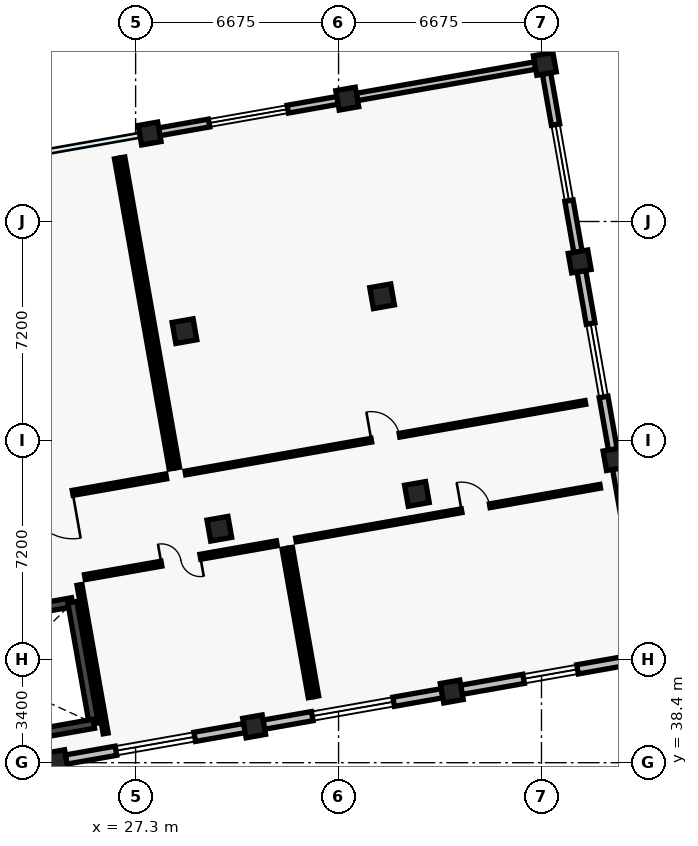
"""IFC4 building model, lengths in metres.
Left out: names, types, materials, properties, quantities, classifications, styles, units other than length and angle.
Written with IfcOpenShell. Run it as: python <this file> out.ifc"""

import sys

from ifc_helpers import new_model, si_unit, direction, frame, frame_2d, origin, origin_2d, place, context, subcontext, project, spatial, rectangle, extrude, element, fill, save


model = new_model("IFC4")
c1 = context("Model", 3, precision=1e-05, world=origin(), true_north=direction((0.0, 1.0)))
c2 = subcontext(c1, "Body", "Model", "MODEL_VIEW")
j1 = project(units=[si_unit("LENGTHUNIT", "METRE"), si_unit("PLANEANGLEUNIT", "RADIAN")], contexts=[c1])
p1 = place(None, origin())
s1 = spatial("IfcSite", under=j1, at=p1, CompositionType="ELEMENT")
p2 = place(p1, origin())
s2 = spatial("IfcBuilding", under=s1, at=p2, CompositionType="ELEMENT")
p3 = place(p2, frame((0.0, 0.0, 23.1)))
s3 = spatial("IfcBuildingStorey", under=s2, at=p3, CompositionType="ELEMENT", Elevation=23.1)
for number, where, z_axis, x_axis in (
    (1, (24.699, 38.448, 0.0), (0.0, 0.0, 1.0), (0.985, 0.174, 0.0)),
    (2, (31.199, 39.594, 0.0), (0.0, 0.0, 1.0), (0.985, 0.174, 0.0)),
):
    element("IfcColumn", number, at=place(p3, frame(where, z_axis=z_axis, x_axis=x_axis)), inside=s3, PredefinedType="COLUMN", context=c2, shape_type="SweptSolid", body=[
        extrude(rectangle(XDim=0.65, YDim=0.65, at=origin_2d()), origin(), (0.0, 0.0, 1.0), 4.31),
    ])
for number, where, z_axis, x_axis in (
    (3, (30.053, 46.094, 0.0), (0.0, 0.0, 1.0), (0.985, 0.174, 0.0)),
    (4, (28.907, 52.594, 0.0), (0.0, 0.0, 1.0), (0.985, 0.174, 0.0)),
):
    element("IfcColumn", number, at=place(p3, frame(where, z_axis=z_axis, x_axis=x_axis)), inside=s3, PredefinedType="COLUMN", context=c2, shape_type="SweptSolid", body=[
        extrude(rectangle(XDim=0.7, YDim=0.7, at=origin_2d()), origin(), (0.0, 0.0, 1.0), 4.31),
    ])
for number, where, z_axis, x_axis in (
    (5, (27.761, 59.094, 0.0), (0.0, 0.0, 1.0), (0.985, 0.174, 0.0)),
    (6, (37.699, 40.74, 0.0), (0.0, 0.0, 1.0), (0.985, 0.174, 0.0)),
):
    element("IfcColumn", number, at=place(p3, frame(where, z_axis=z_axis, x_axis=x_axis)), inside=s3, PredefinedType="COLUMN", context=c2, shape_type="SweptSolid", body=[
        extrude(rectangle(XDim=0.65, YDim=0.65, at=origin_2d()), origin(), (0.0, 0.0, 1.0), 4.31),
    ])
for number, where, z_axis, x_axis in (
    (7, (36.552, 47.24, 0.0), (0.0, 0.0, 1.0), (0.985, 0.174, 0.0)),
    (8, (35.406, 53.74, 0.0), (0.0, 0.0, 1.0), (0.985, 0.174, 0.0)),
):
    element("IfcColumn", number, at=place(p3, frame(where, z_axis=z_axis, x_axis=x_axis)), inside=s3, PredefinedType="COLUMN", context=c2, shape_type="SweptSolid", body=[
        extrude(rectangle(XDim=0.7, YDim=0.7, at=origin_2d()), origin(), (0.0, 0.0, 1.0), 4.31),
    ])
for number, where, z_axis, x_axis in (
    (9, (34.26, 60.24, 0.0), (0.0, 0.0, 1.0), (0.985, 0.174, 0.0)),
    (10, (43.052, 48.386, 0.0), (0.0, 0.0, 1.0), (0.985, 0.174, 0.0)),
    (11, (41.906, 54.886, 0.0), (0.0, 0.0, 1.0), (0.985, 0.174, 0.0)),
    (12, (40.76, 61.386, 0.0), (0.0, 0.0, 1.0), (0.985, 0.174, 0.0)),
):
    element("IfcColumn", number, at=place(p3, frame(where, z_axis=z_axis, x_axis=x_axis)), inside=s3, PredefinedType="COLUMN", context=c2, shape_type="SweptSolid", body=[
        extrude(rectangle(XDim=0.65, YDim=0.65, at=origin_2d()), origin(), (0.0, 0.0, 1.0), 4.31),
    ])
p4 = place(p3, frame((28.076, 59.149, 0.0), z_axis=(0.0, 0.0, 1.0), x_axis=(0.98480829201, 0.173645120828, 0.0)))
e13 = element("IfcWall", 13, at=p4, inside=s3, PredefinedType="STANDARD", context=c2, shape_type="SweptSolid", body=[
    extrude(rectangle(XDim=5.96, YDim=0.26, at=frame_2d((2.98, 0.0))), origin(), (0.0, 0.0, 1.0), 3.795),
])
p5 = place(p4, frame((1.665, 0.0, 0.95)))
e14 = element("IfcOpeningElement", 14, at=p5, cuts=e13, PredefinedType="OPENING", context=c2, shape_type="SweptSolid", body=[
    extrude(rectangle(XDim=2.63, YDim=1.42, at=frame_2d((1.315, 0.71))), frame((0.0, 0.13, 0.0), z_axis=(0.0, -1.0, 0.0), x_axis=(1.0, 0.0, 0.0)), (0.0, 0.0, 1.0), 0.26),
])
p6 = place(p3, frame((34.575, 60.295, 0.0), z_axis=(0.0, 0.0, 1.0), x_axis=(0.984809527099, 0.173638116021, 0.0)))
e15 = element("IfcWall", 15, at=p6, inside=s3, PredefinedType="STANDARD", context=c2, shape_type="SweptSolid", body=[
    extrude(rectangle(XDim=5.96, YDim=0.245, at=frame_2d((2.98, 0.0))), origin(), (0.0, 0.0, 1.0), 3.795),
])
p7 = place(p3, frame((40.816, 61.071, 0.0), z_axis=(0.0, 0.0, 1.0), x_axis=(0.173645120828, -0.98480829201, 0.0)))
e16 = element("IfcWall", 16, at=p7, inside=s3, PredefinedType="STANDARD", context=c2, shape_type="SweptSolid", body=[
    extrude(rectangle(XDim=5.96, YDim=0.275, at=frame_2d((2.98, 0.0))), origin(), (0.0, 0.0, 1.0), 3.795),
])
p8 = place(p7, frame((1.71, 0.0, 0.95)))
e17 = element("IfcOpeningElement", 17, at=p8, cuts=e16, PredefinedType="OPENING", context=c2, shape_type="SweptSolid", body=[
    extrude(rectangle(XDim=2.54, YDim=1.4, at=frame_2d((1.27, 0.7))), frame((0.0, 0.137, 0.0), z_axis=(0.0, -1.0, 0.0), x_axis=(1.0, 0.0, 0.0)), (0.0, 0.0, 1.0), 0.275),
])
p9 = place(p3, frame((41.962, 54.571, 0.0), z_axis=(0.0, 0.0, 1.0), x_axis=(0.173645120828, -0.98480829201, 0.0)))
e18 = element("IfcWall", 18, at=p9, inside=s3, PredefinedType="STANDARD", context=c2, shape_type="SweptSolid", body=[
    extrude(rectangle(XDim=5.96, YDim=0.29, at=frame_2d((2.98, 0.0))), origin(), (0.0, 0.0, 1.0), 3.795),
])
p10 = place(p9, frame((1.755, 0.0, 0.95)))
e19 = element("IfcOpeningElement", 19, at=p10, cuts=e18, PredefinedType="OPENING", context=c2, shape_type="SweptSolid", body=[
    extrude(rectangle(XDim=2.45, YDim=1.38, at=frame_2d((1.225, 0.69))), frame((0.0, 0.145, 0.0), z_axis=(0.0, -1.0, 0.0), x_axis=(1.0, 0.0, 0.0)), (0.0, 0.0, 1.0), 0.29),
])
p11 = place(p3, frame((43.108, 48.071, 0.0), z_axis=(0.0, 0.0, 1.0), x_axis=(0.173645120828, -0.98480829201, 0.0)))
e20 = element("IfcWall", 20, at=p11, inside=s3, PredefinedType="STANDARD", context=c2, shape_type="SweptSolid", body=[
    extrude(rectangle(XDim=5.96, YDim=0.245, at=frame_2d((2.98, 0.0))), origin(), (0.0, 0.0, 1.0), 3.795),
])
p12 = place(p11, frame((1.8, 0.0, 0.95)))
e21 = element("IfcOpeningElement", 21, at=p12, cuts=e20, PredefinedType="OPENING", context=c2, shape_type="SweptSolid", body=[
    extrude(rectangle(XDim=2.36, YDim=1.36, at=frame_2d((1.18, 0.68))), frame((0.0, 0.123, 0.0), z_axis=(0.0, -1.0, 0.0), x_axis=(1.0, 0.0, 0.0)), (0.0, 0.0, 1.0), 0.245),
])
p13 = place(p3, frame((43.883, 41.831, 0.0), z_axis=(0.0, 0.0, 1.0), x_axis=(-0.98480829201, -0.173645120828, 0.0)))
e22 = element("IfcWall", 22, at=p13, inside=s3, PredefinedType="STANDARD", context=c2, shape_type="SweptSolid", body=[
    extrude(rectangle(XDim=5.96, YDim=0.305, at=frame_2d((2.98, 0.0))), origin(), (0.0, 0.0, 1.0), 3.795),
])
p14 = place(p13, frame((2.08, 0.0, 0.95)))
e23 = element("IfcOpeningElement", 23, at=p14, cuts=e22, PredefinedType="OPENING", context=c2, shape_type="SweptSolid", body=[
    extrude(rectangle(XDim=1.8, YDim=1.65, at=frame_2d((0.9, 0.825))), frame((0.0, 0.152, 0.0), z_axis=(0.0, -1.0, 0.0), x_axis=(1.0, 0.0, 0.0)), (0.0, 0.0, 1.0), 0.305),
])
p15 = place(p3, frame((37.384, 40.685, 0.0), z_axis=(0.0, 0.0, 1.0), x_axis=(-0.98480829201, -0.173645120828, 0.0)))
e24 = element("IfcWall", 24, at=p15, inside=s3, PredefinedType="STANDARD", context=c2, shape_type="SweptSolid", body=[
    extrude(rectangle(XDim=5.96, YDim=0.305, at=frame_2d((2.98, 0.0))), origin(), (0.0, 0.0, 1.0), 3.795),
])
p16 = place(p15, frame((1.62, 0.0, 0.95)))
e25 = element("IfcOpeningElement", 25, at=p16, cuts=e24, PredefinedType="OPENING", context=c2, shape_type="SweptSolid", body=[
    extrude(rectangle(XDim=2.72, YDim=1.44, at=frame_2d((1.36, 0.72))), frame((0.0, 0.152, 0.0), z_axis=(0.0, -1.0, 0.0), x_axis=(1.0, 0.0, 0.0)), (0.0, 0.0, 1.0), 0.305),
])
p17 = place(p3, frame((30.884, 39.539, 0.0), z_axis=(0.0, 0.0, 1.0), x_axis=(-0.98480829201, -0.173645120828, 0.0)))
e26 = element("IfcWall", 26, at=p17, inside=s3, PredefinedType="STANDARD", context=c2, shape_type="SweptSolid", body=[
    extrude(rectangle(XDim=5.96, YDim=0.305, at=frame_2d((2.98, 0.0))), origin(), (0.0, 0.0, 1.0), 3.795),
])
p18 = place(p17, frame((1.665, 0.0, 0.95)))
e27 = element("IfcOpeningElement", 27, at=p18, cuts=e26, PredefinedType="OPENING", context=c2, shape_type="SweptSolid", body=[
    extrude(rectangle(XDim=2.63, YDim=1.42, at=frame_2d((1.315, 0.71))), frame((0.0, 0.152, 0.0), z_axis=(0.0, -1.0, 0.0), x_axis=(1.0, 0.0, 0.0)), (0.0, 0.0, 1.0), 0.305),
])
p19 = place(p3, frame((17.863, 42.381, 0.0), z_axis=(0.0, 0.0, 1.0), x_axis=(0.984808225754, 0.173645496596, 0.0)))
e28 = element("IfcWall", 28, at=p19, inside=s3, PredefinedType="SHEAR", context=c2, shape_type="SweptSolid", body=[
    extrude(rectangle(XDim=7.47, YDim=0.3, at=frame_2d((3.735, 0.0))), origin(), (0.0, 0.0, 1.0), 4.28),
])
p20 = place(p19, frame((0.18, 0.0, 0.0)))
e29 = element("IfcOpeningElement", 29, at=p20, cuts=e28, PredefinedType="OPENING", context=c2, shape_type="SweptSolid", body=[
    extrude(rectangle(XDim=1.08, YDim=2.15, at=frame_2d((0.54, 1.075))), frame((0.0, 0.15, 0.0), z_axis=(0.0, -1.0, 0.0), x_axis=(1.0, 0.0, 0.0)), (0.0, 0.0, 1.0), 0.3),
])
p21 = place(p3, frame((25.219, 43.678, 0.0), z_axis=(0.0, 0.0, 1.0), x_axis=(0.173665267602, -0.984804739443, 0.0)))
e30 = element("IfcWall", 30, at=p21, inside=s3, PredefinedType="SHEAR", context=c2, shape_type="SweptSolid", body=[
    extrude(rectangle(XDim=4.06, YDim=0.3, at=frame_2d((2.03, 0.0))), origin(), (0.0, 0.0, 1.0), 4.28),
])
p22 = place(p3, frame((25.924, 39.68, 0.0), z_axis=(0.0, 0.0, 1.0), x_axis=(-0.984809211193, -0.173639907711, 0.0)))
e31 = element("IfcWall", 31, at=p22, inside=s3, PredefinedType="SHEAR", context=c2, shape_type="SweptSolid", body=[
    extrude(rectangle(XDim=7.47, YDim=0.3, at=frame_2d((3.735, 0.0))), origin(), (0.0, 0.0, 1.0), 4.28),
])
p23 = place(p3, frame((20.665, 46.469, 0.0), z_axis=(0.0, 0.0, 1.0), x_axis=(0.984804455571, 0.173666877348, 0.0)))
e32 = element("IfcWall", 32, at=p23, inside=s3, PredefinedType="PARTITIONING", context=c2, shape_type="SweptSolid", body=[
    extrude(rectangle(XDim=7.76, YDim=0.165, at=frame_2d((3.88, 0.0))), origin(), (0.0, 0.0, 1.0), 3.845),
])
p24 = place(p23, frame((3.125, 0.0, 0.0)))
e33 = element("IfcOpeningElement", 33, at=p24, cuts=e32, PredefinedType="OPENING", context=c2, shape_type="SweptSolid", body=[
    extrude(rectangle(XDim=1.51, YDim=2.12, at=frame_2d((0.755, 1.06))), frame((0.0, 0.083, 0.0), z_axis=(0.0, -1.0, 0.0), x_axis=(1.0, 0.0, 0.0)), (0.0, 0.0, 1.0), 0.165),
])
p25 = place(p3, frame((28.486, 48.072, 0.0), z_axis=(0.0, 0.0, 1.0), x_axis=(-0.173654930775, 0.984806562233, 0.0)))
e34 = element("IfcWall", 34, at=p25, inside=s3, PredefinedType="PARTITIONING", context=c2, shape_type="SweptSolid", body=[
    extrude(rectangle(XDim=10.36, YDim=0.165, at=frame_2d((5.18, 0.0))), origin(), (0.0, 0.0, 1.0), 3.95),
])
p26 = place(p3, frame((28.938, 47.928, 0.0), z_axis=(0.0, 0.0, 1.0), x_axis=(0.984809119622, 0.173640427059, 0.0)))
e35 = element("IfcWall", 35, at=p26, inside=s3, PredefinedType="PARTITIONING", context=c2, shape_type="SweptSolid", body=[
    extrude(rectangle(XDim=13.36, YDim=0.125, at=frame_2d((6.68, 0.0))), origin(), (0.0, 0.0, 1.0), 3.845),
])
p27 = place(p26, frame((6.21, 0.0, 0.0)))
e36 = element("IfcOpeningElement", 36, at=p27, cuts=e35, PredefinedType="OPENING", context=c2, shape_type="SweptSolid", body=[
    extrude(rectangle(XDim=0.94, YDim=2.12, at=frame_2d((0.47, 1.06))), frame((0.0, 0.062, 0.0), z_axis=(0.0, -1.0, 0.0), x_axis=(1.0, 0.0, 0.0)), (0.0, 0.0, 1.0), 0.125),
])
p28 = place(p3, frame((26.884, 58.309, 0.0), z_axis=(0.0, 0.0, 1.0), x_axis=(0.173654930775, -0.984806562233, 0.0)))
e37 = element("IfcWall", 37, at=p28, inside=s3, PredefinedType="PARTITIONING", context=c2, shape_type="SweptSolid", body=[
    extrude(rectangle(XDim=10.36, YDim=0.125, at=frame_2d((5.18, 0.0))), origin(), (0.0, 0.0, 1.0), 3.95),
])
p29 = place(p3, frame((33.061, 40.552, 0.0), z_axis=(0.0, 0.0, 1.0), x_axis=(-0.173658971256, 0.98480584975, 0.0)))
e38 = element("IfcWall", 38, at=p29, inside=s3, PredefinedType="PARTITIONING", context=c2, shape_type="SweptSolid", body=[
    extrude(rectangle(XDim=4.96, YDim=0.165, at=frame_2d((2.48, 0.0))), origin(), (0.0, 0.0, 1.0), 3.95),
])
p30 = place(p3, frame((31.945, 45.615, 0.0), z_axis=(0.0, 0.0, 1.0), x_axis=(-0.984809620557, -0.173637585958, 0.0)))
e39 = element("IfcWall", 39, at=p30, inside=s3, PredefinedType="PARTITIONING", context=c2, shape_type="SweptSolid", body=[
    extrude(rectangle(XDim=6.41, YDim=0.165, at=frame_2d((3.205, 0.0))), origin(), (0.0, 0.0, 1.0), 3.95),
])
p31 = place(p30, frame((2.555, 0.0, 0.0)))
e40 = element("IfcOpeningElement", 40, at=p31, cuts=e39, PredefinedType="OPENING", context=c2, shape_type="SweptSolid", body=[
    extrude(rectangle(XDim=1.3, YDim=2.18, at=frame_2d((0.65, 1.09))), frame((0.0, 0.083, 0.0), z_axis=(0.0, -1.0, 0.0), x_axis=(1.0, 0.0, 0.0)), (0.0, 0.0, 1.0), 0.165),
])
p32 = place(p3, frame((25.454, 44.247, 0.0), z_axis=(0.0, 0.0, 1.0), x_axis=(0.173658971256, -0.98480584975, 0.0)))
e41 = element("IfcWall", 41, at=p32, inside=s3, PredefinedType="PARTITIONING", context=c2, shape_type="SweptSolid", body=[
    extrude(rectangle(XDim=4.96, YDim=0.165, at=frame_2d((2.48, 0.0))), origin(), (0.0, 0.0, 1.0), 3.95),
])
p33 = place(p3, frame((42.581, 47.491, 0.0), z_axis=(0.0, 0.0, 1.0), x_axis=(-0.98480532288, -0.173661959067, 0.0)))
e42 = element("IfcWall", 42, at=p33, inside=s3, PredefinedType="PARTITIONING", context=c2, shape_type="SweptSolid", body=[
    extrude(rectangle(XDim=10.16, YDim=0.125, at=frame_2d((5.08, 0.0))), origin(), (0.0, 0.0, 1.0), 3.95),
])
p34 = place(p33, frame((3.688, 0.0, 0.0)))
e43 = element("IfcOpeningElement", 43, at=p34, cuts=e42, PredefinedType="OPENING", context=c2, shape_type="SweptSolid", body=[
    extrude(rectangle(XDim=0.94, YDim=2.12, at=frame_2d((0.47, 1.06))), frame((0.0, 0.062, 0.0), z_axis=(0.0, -1.0, 0.0), x_axis=(1.0, 0.0, 0.0)), (0.0, 0.0, 1.0), 0.125),
])
p35 = place(p3, frame((32.396, 45.472, 0.0), z_axis=(0.0, 0.0, 1.0), x_axis=(0.173650553511, -0.984807334084, 0.0)))
e44 = element("IfcWall", 44, at=p35, inside=s3, PredefinedType="PARTITIONING", context=c2, shape_type="SweptSolid", body=[
    extrude(rectangle(XDim=4.96, YDim=0.125, at=frame_2d((2.48, 0.0))), origin(), (0.0, 0.0, 1.0), 3.95),
])
p36 = place(p5, origin())
e45 = element("IfcWindow", 45, at=p36, inside=s3, PartitioningType="SINGLE_PANEL", PredefinedType="WINDOW", context=c2, shape_type="SweptSolid", body=[
    extrude(rectangle(XDim=2.63, YDim=1.42, at=frame_2d((1.315, 0.71))), frame((0.0, 0.03, 0.0), z_axis=(0.0, -1.0, 0.0), x_axis=(1.0, 0.0, 0.0)), (0.0, 0.0, 1.0), 0.06),
])
fill(e14, e45)
p37 = place(p8, origin())
e46 = element("IfcWindow", 46, at=p37, inside=s3, PartitioningType="SINGLE_PANEL", PredefinedType="WINDOW", context=c2, shape_type="SweptSolid", body=[
    extrude(rectangle(XDim=2.54, YDim=1.4, at=frame_2d((1.27, 0.7))), frame((0.0, 0.03, 0.0), z_axis=(0.0, -1.0, 0.0), x_axis=(1.0, 0.0, 0.0)), (0.0, 0.0, 1.0), 0.06),
])
fill(e17, e46)
p38 = place(p10, origin())
e47 = element("IfcWindow", 47, at=p38, inside=s3, PartitioningType="SINGLE_PANEL", PredefinedType="WINDOW", context=c2, shape_type="SweptSolid", body=[
    extrude(rectangle(XDim=2.45, YDim=1.38, at=frame_2d((1.225, 0.69))), frame((0.0, 0.03, 0.0), z_axis=(0.0, -1.0, 0.0), x_axis=(1.0, 0.0, 0.0)), (0.0, 0.0, 1.0), 0.06),
])
fill(e19, e47)
p39 = place(p14, origin())
e48 = element("IfcWindow", 48, at=p39, inside=s3, PartitioningType="SINGLE_PANEL", PredefinedType="WINDOW", context=c2, shape_type="SweptSolid", body=[
    extrude(rectangle(XDim=1.8, YDim=1.65, at=frame_2d((0.9, 0.825))), frame((0.0, 0.03, 0.0), z_axis=(0.0, -1.0, 0.0), x_axis=(1.0, 0.0, 0.0)), (0.0, 0.0, 1.0), 0.06),
])
fill(e23, e48)
p40 = place(p16, origin())
e49 = element("IfcWindow", 49, at=p40, inside=s3, PartitioningType="SINGLE_PANEL", PredefinedType="WINDOW", context=c2, shape_type="SweptSolid", body=[
    extrude(rectangle(XDim=2.72, YDim=1.44, at=frame_2d((1.36, 0.72))), frame((0.0, 0.03, 0.0), z_axis=(0.0, -1.0, 0.0), x_axis=(1.0, 0.0, 0.0)), (0.0, 0.0, 1.0), 0.06),
])
fill(e25, e49)
p41 = place(p18, origin())
e50 = element("IfcWindow", 50, at=p41, inside=s3, PartitioningType="SINGLE_PANEL", PredefinedType="WINDOW", context=c2, shape_type="SweptSolid", body=[
    extrude(rectangle(XDim=2.63, YDim=1.42, at=frame_2d((1.315, 0.71))), frame((0.0, 0.03, 0.0), z_axis=(0.0, -1.0, 0.0), x_axis=(1.0, 0.0, 0.0)), (0.0, 0.0, 1.0), 0.06),
])
fill(e27, e50)
p42 = place(p24, origin())
e51 = element("IfcDoor", 51, at=p42, inside=s3, OperationType="SINGLE_SWING_RIGHT", PredefinedType="DOOR", context=c2, shape_type="SweptSolid", body=[
    extrude(rectangle(XDim=1.51, YDim=2.12, at=frame_2d((0.755, 1.06))), frame((0.0, 0.025, 0.0), z_axis=(0.0, -1.0, 0.0), x_axis=(1.0, 0.0, 0.0)), (0.0, 0.0, 1.0), 0.05),
])
fill(e33, e51)
p43 = place(p27, origin())
e52 = element("IfcDoor", 52, at=p43, inside=s3, OperationType="SINGLE_SWING_LEFT", PredefinedType="DOOR", context=c2, shape_type="SweptSolid", body=[
    extrude(rectangle(XDim=0.94, YDim=2.12, at=frame_2d((0.47, 1.06))), frame((0.0, 0.025, 0.0), z_axis=(0.0, -1.0, 0.0), x_axis=(1.0, 0.0, 0.0)), (0.0, 0.0, 1.0), 0.05),
])
fill(e36, e52)
p44 = place(p31, origin())
e53 = element("IfcDoor", 53, at=p44, inside=s3, OperationType="DOUBLE_DOOR_SINGLE_SWING", PredefinedType="DOOR", context=c2, shape_type="SweptSolid", body=[
    extrude(rectangle(XDim=1.3, YDim=2.18, at=frame_2d((0.65, 1.09))), frame((0.0, 0.025, 0.0), z_axis=(0.0, -1.0, 0.0), x_axis=(1.0, 0.0, 0.0)), (0.0, 0.0, 1.0), 0.05),
])
fill(e40, e53)
p45 = place(p34, origin())
e54 = element("IfcDoor", 54, at=p45, inside=s3, OperationType="SINGLE_SWING_RIGHT", PredefinedType="DOOR", context=c2, shape_type="SweptSolid", body=[
    extrude(rectangle(XDim=0.94, YDim=2.12, at=frame_2d((0.47, 1.06))), frame((0.0, 0.025, 0.0), z_axis=(0.0, -1.0, 0.0), x_axis=(1.0, 0.0, 0.0)), (0.0, 0.0, 1.0), 0.05),
])
fill(e43, e54)
save(model, sys.argv[1])
